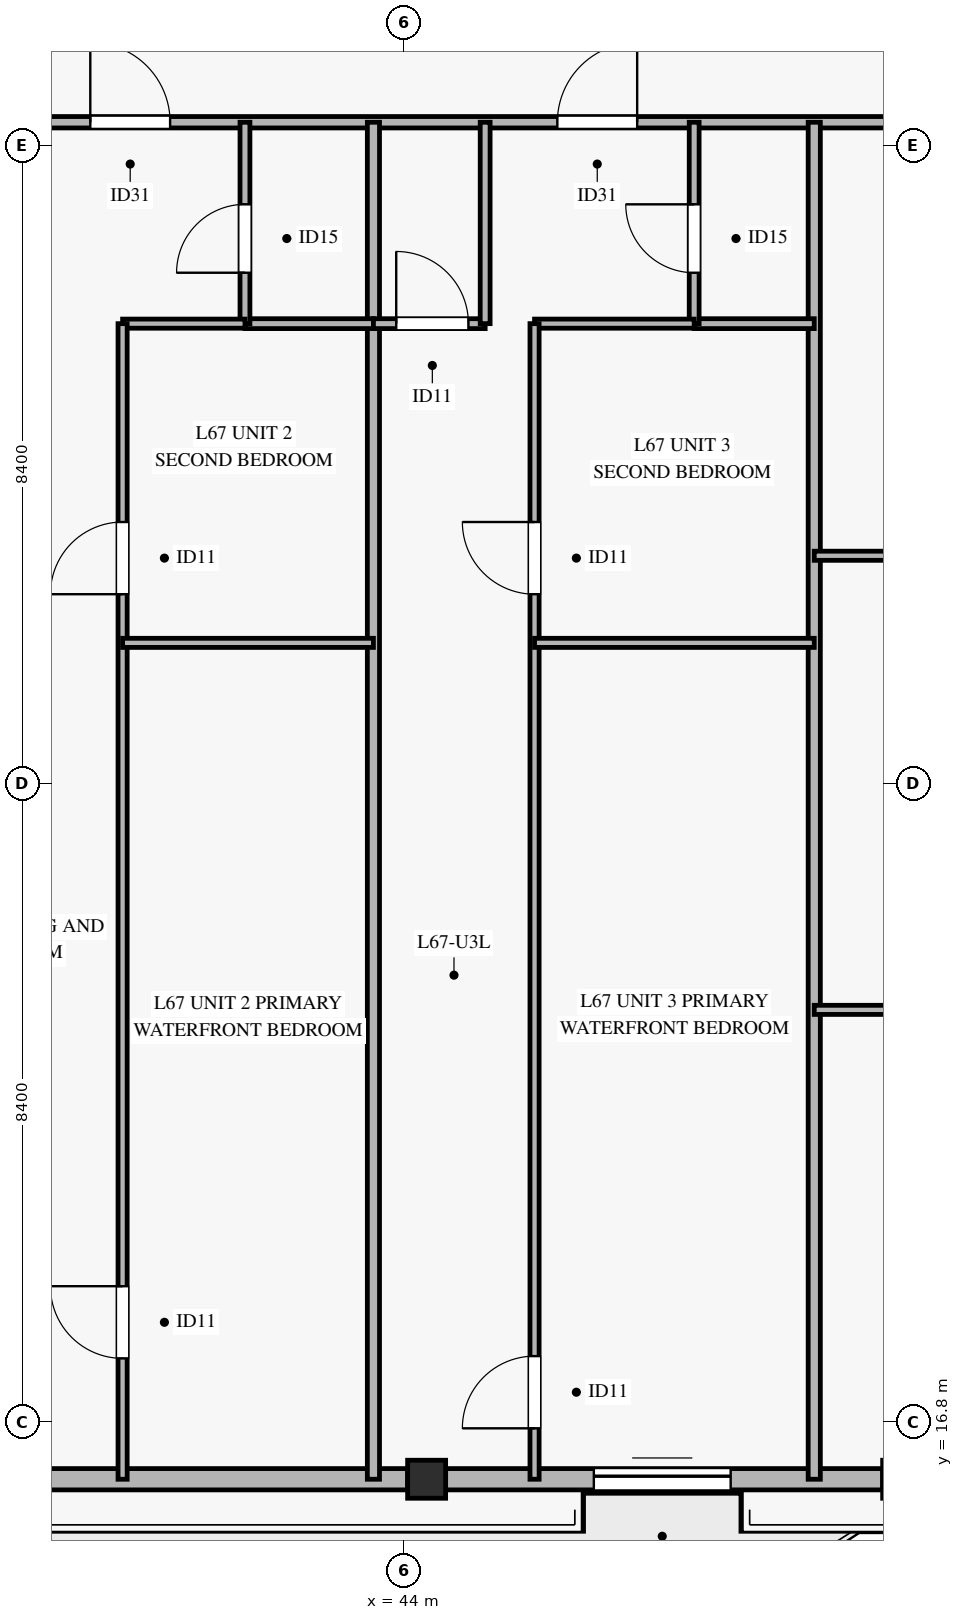
"""IFC4 building model, lengths in metres.
Left out: names, types, materials, properties, quantities, classifications, styles, units other than length and angle.
Written with IfcOpenShell. Run it as: python <this file> out.ifc"""

import sys

from ifc_helpers import new_model, si_unit, direction, frame, frame_2d, origin, origin_2d, place, context, subcontext, project, spatial, rectangle, hollow_rectangle, extrude, source, transform, mapped, element, fill, save


model = new_model("IFC4")
c1 = context("Model", 3, precision=1e-05, world=origin(), true_north=direction((0.0, 1.0)))
c2 = subcontext(c1, "Body", "Model", "MODEL_VIEW")
j1 = project(units=[si_unit("LENGTHUNIT", "METRE"), si_unit("PLANEANGLEUNIT", "RADIAN")], contexts=[c1])
p1 = place(None, origin())
s1 = spatial("IfcSite", under=j1, at=p1, CompositionType="ELEMENT")
p2 = place(p1, origin())
s2 = spatial("IfcBuilding", under=s1, at=p2, CompositionType="ELEMENT")
p3 = place(p2, frame((0.0, 0.0, 262.1)))
s3 = spatial("IfcBuildingStorey", under=s2, at=p3, CompositionType="ELEMENT", Elevation=262.1)
m1 = source(origin(), c2, "Body", "SweptSolid", [
    extrude(hollow_rectangle(XDim=0.5, YDim=0.5, WallThickness=0.024, at=origin_2d()), origin(), (0.0, 0.0, 1.0), 3.185),
])
for number, where, z_axis, x_axis in (
    (1, (44.3, 16.045, 0.0), (0.0, 0.0, 1.0), (1.0, 0.0, 0.0)),
    (2, (50.55, 16.045, 0.0), (0.0, 0.0, 1.0), (1.0, 0.0, 0.0)),
):
    element("IfcColumn", number, at=place(p3, frame(where, z_axis=z_axis, x_axis=x_axis)), inside=s3, PredefinedType="COLUMN", context=c2, shape_type="MappedRepresentation", body=[
        mapped(m1, transform((0.0, 0.0, 0.0), x_axis=(1.0, 0.0, 0.0), y_axis=(0.0, 1.0, 0.0), z_axis=(0.0, 0.0, 1.0), scale=1.0)),
    ])
p4 = place(p3, frame((37.8, 16.045, 0.0), z_axis=(0.0, 0.0, 1.0), x_axis=(1.0, 0.0, 0.0)))
e3 = element("IfcWall", 3, at=p4, inside=s3, PredefinedType="SOLIDWALL", context=c2, shape_type="SweptSolid", body=[
    extrude(rectangle(XDim=6.25, YDim=0.28, at=frame_2d((3.125, 0.0))), origin(), (0.0, 0.0, 1.0), 2.815),
])
p5 = place(p3, frame((44.55, 16.045, 0.0), z_axis=(0.0, 0.0, 1.0), x_axis=(1.0, 0.0, 0.0)))
e4 = element("IfcWall", 4, at=p5, inside=s3, PredefinedType="SOLIDWALL", context=c2, shape_type="SweptSolid", body=[
    extrude(rectangle(XDim=5.75, YDim=0.28, at=frame_2d((2.875, 0.0))), origin(), (0.0, 0.0, 1.0), 2.815),
])
p6 = place(p5, frame((1.95, 0.0, 0.0)))
e5 = element("IfcOpeningElement", 5, at=p6, cuts=e4, PredefinedType="OPENING", context=c2, shape_type="SweptSolid", body=[
    extrude(rectangle(XDim=1.8, YDim=2.25, at=frame_2d((0.9, 1.125))), frame((0.0, 0.15, 0.0), z_axis=(0.0, -1.0, 0.0), x_axis=(1.0, 0.0, 0.0)), (0.0, 0.0, 1.0), 0.3),
])
p7 = place(p3, frame((8.779, 33.9, 0.0), z_axis=(0.0, 0.0, 1.0), x_axis=(1.0, 0.0, 0.0)))
e6 = element("IfcWall", 6, at=p7, inside=s3, PredefinedType="PARTITIONING", context=c2, shape_type="SweptSolid", body=[
    extrude(rectangle(XDim=52.843, YDim=0.15, at=frame_2d((26.421, 0.0))), origin(), (0.0, 0.0, 1.0), 2.47),
])
p8 = place(p7, frame((5.887, 0.0, 0.0)))
e7 = element("IfcOpeningElement", 7, at=p8, cuts=e6, PredefinedType="OPENING", context=c2, shape_type="SweptSolid", body=[
    extrude(rectangle(XDim=1.05, YDim=2.15, at=frame_2d((0.525, 1.075))), frame((0.0, 0.085, 0.0), z_axis=(0.0, -1.0, 0.0), x_axis=(1.0, 0.0, 0.0)), (0.0, 0.0, 1.0), 0.17),
])
p9 = place(p7, frame((17.646, 0.0, 0.0)))
e8 = element("IfcOpeningElement", 8, at=p9, cuts=e6, PredefinedType="OPENING", context=c2, shape_type="SweptSolid", body=[
    extrude(rectangle(XDim=1.05, YDim=2.15, at=frame_2d((0.525, 1.075))), frame((0.0, 0.085, 0.0), z_axis=(0.0, -1.0, 0.0), x_axis=(1.0, 0.0, 0.0)), (0.0, 0.0, 1.0), 0.17),
])
p10 = place(p7, frame((24.174, 0.0, 0.0)))
e9 = element("IfcOpeningElement", 9, at=p10, cuts=e6, PredefinedType="OPENING", context=c2, shape_type="SweptSolid", body=[
    extrude(rectangle(XDim=1.05, YDim=2.15, at=frame_2d((0.525, 1.075))), frame((0.0, 0.085, 0.0), z_axis=(0.0, -1.0, 0.0), x_axis=(1.0, 0.0, 0.0)), (0.0, 0.0, 1.0), 0.17),
])
p11 = place(p7, frame((31.096, 0.0, 0.0)))
e10 = element("IfcOpeningElement", 10, at=p11, cuts=e6, PredefinedType="OPENING", context=c2, shape_type="SweptSolid", body=[
    extrude(rectangle(XDim=1.05, YDim=2.15, at=frame_2d((0.525, 1.075))), frame((0.0, 0.085, 0.0), z_axis=(0.0, -1.0, 0.0), x_axis=(1.0, 0.0, 0.0)), (0.0, 0.0, 1.0), 0.17),
])
p12 = place(p7, frame((37.241, 0.0, 0.0)))
e11 = element("IfcOpeningElement", 11, at=p12, cuts=e6, PredefinedType="OPENING", context=c2, shape_type="SweptSolid", body=[
    extrude(rectangle(XDim=1.05, YDim=2.15, at=frame_2d((0.525, 1.075))), frame((0.0, 0.085, 0.0), z_axis=(0.0, -1.0, 0.0), x_axis=(1.0, 0.0, 0.0)), (0.0, 0.0, 1.0), 0.17),
])
p13 = place(p7, frame((45.359, 0.0, 0.0)))
e12 = element("IfcOpeningElement", 12, at=p13, cuts=e6, PredefinedType="OPENING", context=c2, shape_type="SweptSolid", body=[
    extrude(rectangle(XDim=1.05, YDim=2.15, at=frame_2d((0.525, 1.075))), frame((0.0, 0.085, 0.0), z_axis=(0.0, -1.0, 0.0), x_axis=(1.0, 0.0, 0.0)), (0.0, 0.0, 1.0), 0.17),
])
for number, where, z_axis, x_axis in (
    (13, (43.6, 16.045, 0.0), (0.0, 0.0, 1.0), (0.0, 1.0, 0.0)),
    (14, (49.4, 16.045, 0.0), (0.0, 0.0, 1.0), (0.0, 1.0, 0.0)),
):
    element("IfcWall", number, at=place(p3, frame(where, z_axis=z_axis, x_axis=x_axis)), inside=s3, PredefinedType="PARTITIONING", context=c2, shape_type="SweptSolid", body=[
        extrude(rectangle(XDim=17.855, YDim=0.16, at=frame_2d((8.927, 0.0))), origin(), (0.0, 0.0, 1.0), 2.77),
    ])
p14 = place(p3, frame((41.91, 31.25, 0.0), z_axis=(0.0, 0.0, 1.0), x_axis=(1.0, 0.0, 0.0)))
e15 = element("IfcWall", 15, at=p14, inside=s3, PredefinedType="PARTITIONING", context=c2, shape_type="SweptSolid", body=[
    extrude(rectangle(XDim=1.69, YDim=0.13, at=frame_2d((0.845, 0.0))), origin(), (0.0, 0.0, 1.0), 3.185),
])
p15 = place(p3, frame((41.91, 31.25, 0.0), z_axis=(0.0, 0.0, 1.0), x_axis=(0.0, 1.0, 0.0)))
e16 = element("IfcWall", 16, at=p15, inside=s3, PredefinedType="PARTITIONING", context=c2, shape_type="SweptSolid", body=[
    extrude(rectangle(XDim=2.65, YDim=0.13, at=frame_2d((1.325, 0.0))), origin(), (0.0, 0.0, 1.0), 2.77),
])
p16 = place(p15, frame((0.67, 0.0, 0.0)))
e17 = element("IfcOpeningElement", 17, at=p16, cuts=e16, PredefinedType="OPENING", context=c2, shape_type="SweptSolid", body=[
    extrude(rectangle(XDim=0.9, YDim=2.1, at=frame_2d((0.45, 1.05))), frame((0.0, 0.075, 0.0), z_axis=(0.0, -1.0, 0.0), x_axis=(1.0, 0.0, 0.0)), (0.0, 0.0, 1.0), 0.15),
])
p17 = place(p3, frame((40.3, 31.25, 0.0), z_axis=(0.0, 0.0, 1.0), x_axis=(1.0, 0.0, 0.0)))
e18 = element("IfcWall", 18, at=p17, inside=s3, PredefinedType="PARTITIONING", context=c2, shape_type="SweptSolid", body=[
    extrude(rectangle(XDim=1.61, YDim=0.12, at=frame_2d((0.805, 0.0))), origin(), (0.0, 0.0, 1.0), 3.185),
])
p18 = place(p3, frame((40.3, 16.045, 0.0), z_axis=(0.0, 0.0, 1.0), x_axis=(0.0, 1.0, 0.0)))
e19 = element("IfcWall", 19, at=p18, inside=s3, PredefinedType="PARTITIONING", context=c2, shape_type="SweptSolid", body=[
    extrude(rectangle(XDim=15.205, YDim=0.12, at=frame_2d((7.603, 0.0))), origin(), (0.0, 0.0, 1.0), 2.77),
])
p19 = place(p18, frame((1.59, 0.0, 0.0)))
e20 = element("IfcOpeningElement", 20, at=p19, cuts=e19, PredefinedType="OPENING", context=c2, shape_type="SweptSolid", body=[
    extrude(rectangle(XDim=0.95, YDim=2.1, at=frame_2d((0.475, 1.05))), frame((0.0, 0.07, 0.0), z_axis=(0.0, -1.0, 0.0), x_axis=(1.0, 0.0, 0.0)), (0.0, 0.0, 1.0), 0.14),
])
p20 = place(p18, frame((11.645, 0.0, 0.0)))
e21 = element("IfcOpeningElement", 21, at=p20, cuts=e19, PredefinedType="OPENING", context=c2, shape_type="SweptSolid", body=[
    extrude(rectangle(XDim=0.95, YDim=2.1, at=frame_2d((0.475, 1.05))), frame((0.0, 0.07, 0.0), z_axis=(0.0, -1.0, 0.0), x_axis=(1.0, 0.0, 0.0)), (0.0, 0.0, 1.0), 0.14),
])
p21 = place(p3, frame((40.3, 27.05, 0.0), z_axis=(0.0, 0.0, 1.0), x_axis=(1.0, 0.0, 0.0)))
e22 = element("IfcWall", 22, at=p21, inside=s3, PredefinedType="PARTITIONING", context=c2, shape_type="SweptSolid", body=[
    extrude(rectangle(XDim=3.3, YDim=0.12, at=frame_2d((1.65, 0.0))), origin(), (0.0, 0.0, 1.0), 3.185),
])
p22 = place(p3, frame((43.6, 31.25, 0.0), z_axis=(0.0, 0.0, 1.0), x_axis=(1.0, 0.0, 0.0)))
e23 = element("IfcWall", 23, at=p22, inside=s3, PredefinedType="PARTITIONING", context=c2, shape_type="SweptSolid", body=[
    extrude(rectangle(XDim=1.47, YDim=0.13, at=frame_2d((0.735, 0.0))), origin(), (0.0, 0.0, 1.0), 2.47),
])
p23 = place(p22, frame((0.3, 0.0, 0.0)))
e24 = element("IfcOpeningElement", 24, at=p23, cuts=e23, PredefinedType="OPENING", context=c2, shape_type="SweptSolid", body=[
    extrude(rectangle(XDim=0.95, YDim=2.1, at=frame_2d((0.475, 1.05))), frame((0.0, 0.075, 0.0), z_axis=(0.0, -1.0, 0.0), x_axis=(1.0, 0.0, 0.0)), (0.0, 0.0, 1.0), 0.15),
])
p24 = place(p3, frame((45.07, 31.25, 0.0), z_axis=(0.0, 0.0, 1.0), x_axis=(0.0, 1.0, 0.0)))
e25 = element("IfcWall", 25, at=p24, inside=s3, PredefinedType="PARTITIONING", context=c2, shape_type="SweptSolid", body=[
    extrude(rectangle(XDim=2.65, YDim=0.13, at=frame_2d((1.325, 0.0))), origin(), (0.0, 0.0, 1.0), 2.77),
])
p25 = place(p3, frame((47.82, 31.25, 0.0), z_axis=(0.0, 0.0, 1.0), x_axis=(1.0, 0.0, 0.0)))
e26 = element("IfcWall", 26, at=p25, inside=s3, PredefinedType="PARTITIONING", context=c2, shape_type="SweptSolid", body=[
    extrude(rectangle(XDim=1.58, YDim=0.13, at=frame_2d((0.79, 0.0))), origin(), (0.0, 0.0, 1.0), 3.185),
])
p26 = place(p3, frame((47.82, 31.25, 0.0), z_axis=(0.0, 0.0, 1.0), x_axis=(0.0, 1.0, 0.0)))
e27 = element("IfcWall", 27, at=p26, inside=s3, PredefinedType="PARTITIONING", context=c2, shape_type="SweptSolid", body=[
    extrude(rectangle(XDim=2.65, YDim=0.13, at=frame_2d((1.325, 0.0))), origin(), (0.0, 0.0, 1.0), 2.77),
])
p27 = place(p26, frame((0.67, 0.0, 0.0)))
e28 = element("IfcOpeningElement", 28, at=p27, cuts=e27, PredefinedType="OPENING", context=c2, shape_type="SweptSolid", body=[
    extrude(rectangle(XDim=0.9, YDim=2.1, at=frame_2d((0.45, 1.05))), frame((0.0, 0.075, 0.0), z_axis=(0.0, -1.0, 0.0), x_axis=(1.0, 0.0, 0.0)), (0.0, 0.0, 1.0), 0.15),
])
p28 = place(p3, frame((45.72, 31.25, 0.0), z_axis=(0.0, 0.0, 1.0), x_axis=(1.0, 0.0, 0.0)))
e29 = element("IfcWall", 29, at=p28, inside=s3, PredefinedType="PARTITIONING", context=c2, shape_type="SweptSolid", body=[
    extrude(rectangle(XDim=2.1, YDim=0.12, at=frame_2d((1.05, 0.0))), origin(), (0.0, 0.0, 1.0), 3.185),
])
p29 = place(p3, frame((45.72, 16.045, 0.0), z_axis=(0.0, 0.0, 1.0), x_axis=(0.0, 1.0, 0.0)))
e30 = element("IfcWall", 30, at=p29, inside=s3, PredefinedType="PARTITIONING", context=c2, shape_type="SweptSolid", body=[
    extrude(rectangle(XDim=15.205, YDim=0.12, at=frame_2d((7.603, 0.0))), origin(), (0.0, 0.0, 1.0), 2.77),
])
p30 = place(p29, frame((0.67, 0.0, 0.0)))
e31 = element("IfcOpeningElement", 31, at=p30, cuts=e30, PredefinedType="OPENING", context=c2, shape_type="SweptSolid", body=[
    extrude(rectangle(XDim=0.95, YDim=2.1, at=frame_2d((0.475, 1.05))), frame((0.0, 0.07, 0.0), z_axis=(0.0, -1.0, 0.0), x_axis=(1.0, 0.0, 0.0)), (0.0, 0.0, 1.0), 0.14),
])
p31 = place(p29, frame((11.645, 0.0, 0.0)))
e32 = element("IfcOpeningElement", 32, at=p31, cuts=e30, PredefinedType="OPENING", context=c2, shape_type="SweptSolid", body=[
    extrude(rectangle(XDim=0.95, YDim=2.1, at=frame_2d((0.475, 1.05))), frame((0.0, 0.07, 0.0), z_axis=(0.0, -1.0, 0.0), x_axis=(1.0, 0.0, 0.0)), (0.0, 0.0, 1.0), 0.14),
])
p32 = place(p3, frame((45.72, 27.05, 0.0), z_axis=(0.0, 0.0, 1.0), x_axis=(1.0, 0.0, 0.0)))
e33 = element("IfcWall", 33, at=p32, inside=s3, PredefinedType="PARTITIONING", context=c2, shape_type="SweptSolid", body=[
    extrude(rectangle(XDim=3.68, YDim=0.12, at=frame_2d((1.84, 0.0))), origin(), (0.0, 0.0, 1.0), 3.185),
])
p33 = place(p3, frame((49.4, 22.221, 0.0), z_axis=(0.0, 0.0, 1.0), x_axis=(1.0, 0.0, 0.0)))
e34 = element("IfcWall", 34, at=p33, inside=s3, PredefinedType="PARTITIONING", context=c2, shape_type="SweptSolid", body=[
    extrude(rectangle(XDim=12.222, YDim=0.12, at=frame_2d((6.111, 0.0))), origin(), (0.0, 0.0, 1.0), 2.47),
])
p34 = place(p33, frame((4.975, 0.0, 0.0)))
e35 = element("IfcOpeningElement", 35, at=p34, cuts=e34, PredefinedType="OPENING", context=c2, shape_type="SweptSolid", body=[
    extrude(rectangle(XDim=0.95, YDim=2.1, at=frame_2d((0.475, 1.05))), frame((0.0, 0.07, 0.0), z_axis=(0.0, -1.0, 0.0), x_axis=(1.0, 0.0, 0.0)), (0.0, 0.0, 1.0), 0.14),
])
p35 = place(p3, frame((49.4, 28.196, 0.0), z_axis=(0.0, 0.0, 1.0), x_axis=(1.0, 0.0, 0.0)))
e36 = element("IfcWall", 36, at=p35, inside=s3, PredefinedType="PARTITIONING", context=c2, shape_type="SweptSolid", body=[
    extrude(rectangle(XDim=12.222, YDim=0.12, at=frame_2d((6.111, 0.0))), origin(), (0.0, 0.0, 1.0), 2.47),
])
p36 = place(p35, frame((4.975, 0.0, 0.0)))
e37 = element("IfcOpeningElement", 37, at=p36, cuts=e36, PredefinedType="OPENING", context=c2, shape_type="SweptSolid", body=[
    extrude(rectangle(XDim=0.95, YDim=2.1, at=frame_2d((0.475, 1.05))), frame((0.0, 0.07, 0.0), z_axis=(0.0, -1.0, 0.0), x_axis=(1.0, 0.0, 0.0)), (0.0, 0.0, 1.0), 0.14),
])
m2 = source(origin(), c2, "Body", "SweptSolid", [
    extrude(rectangle(XDim=1.8, YDim=2.25, at=frame_2d((0.9, 1.125))), frame((0.0, 0.025, 0.0), z_axis=(0.0, -1.0, 0.0), x_axis=(1.0, 0.0, 0.0)), (0.0, 0.0, 1.0), 0.05),
])
p37 = place(p6, origin())
e38 = element("IfcDoor", 38, at=p37, inside=s3, OperationType="SLIDING_TO_LEFT", PredefinedType="DOOR", context=c2, shape_type="MappedRepresentation", body=[
    mapped(m2, transform((0.0, 0.0, 0.0), x_axis=(1.0, 0.0, 0.0), y_axis=(0.0, 1.0, 0.0), z_axis=(0.0, 0.0, 1.0), scale=1.0)),
])
fill(e5, e38)
m3 = source(origin(), c2, "Body", "SweptSolid", [
    extrude(rectangle(XDim=1.05, YDim=2.15, at=frame_2d((0.525, 1.075))), frame((0.0, 0.025, 0.0), z_axis=(0.0, -1.0, 0.0), x_axis=(1.0, 0.0, 0.0)), (0.0, 0.0, 1.0), 0.05),
])
p38 = place(p11, origin())
e39 = element("IfcDoor", 39, at=p38, inside=s3, OperationType="SINGLE_SWING_LEFT", PredefinedType="DOOR", context=c2, shape_type="MappedRepresentation", body=[
    mapped(m3, transform((0.0, 0.0, 0.0), x_axis=(1.0, 0.0, 0.0), y_axis=(0.0, 1.0, 0.0), z_axis=(0.0, 0.0, 1.0), scale=1.0)),
])
fill(e10, e39)
m4 = source(origin(), c2, "Body", "SweptSolid", [
    extrude(rectangle(XDim=0.9, YDim=2.1, at=frame_2d((0.45, 1.05))), frame((0.0, 0.025, 0.0), z_axis=(0.0, -1.0, 0.0), x_axis=(1.0, 0.0, 0.0)), (0.0, 0.0, 1.0), 0.05),
])
p39 = place(p16, origin())
e40 = element("IfcDoor", 40, at=p39, inside=s3, OperationType="SINGLE_SWING_LEFT", PredefinedType="DOOR", context=c2, shape_type="MappedRepresentation", body=[
    mapped(m4, transform((0.0, 0.0, 0.0), x_axis=(1.0, 0.0, 0.0), y_axis=(0.0, 1.0, 0.0), z_axis=(0.0, 0.0, 1.0), scale=1.0)),
])
fill(e17, e40)
m5 = source(origin(), c2, "Body", "SweptSolid", [
    extrude(rectangle(XDim=0.95, YDim=2.1, at=frame_2d((0.475, 1.05))), frame((0.0, 0.025, 0.0), z_axis=(0.0, -1.0, 0.0), x_axis=(1.0, 0.0, 0.0)), (0.0, 0.0, 1.0), 0.05),
])
p40 = place(p19, origin())
e41 = element("IfcDoor", 41, at=p40, inside=s3, OperationType="SINGLE_SWING_RIGHT", PredefinedType="DOOR", context=c2, shape_type="MappedRepresentation", body=[
    mapped(m5, transform((0.0, 0.0, 0.0), x_axis=(1.0, 0.0, 0.0), y_axis=(0.0, 1.0, 0.0), z_axis=(0.0, 0.0, 1.0), scale=1.0)),
])
fill(e20, e41)
p41 = place(p20, origin())
e42 = element("IfcDoor", 42, at=p41, inside=s3, OperationType="SINGLE_SWING_LEFT", PredefinedType="DOOR", context=c2, shape_type="MappedRepresentation", body=[
    mapped(m5, transform((0.0, 0.0, 0.0), x_axis=(1.0, 0.0, 0.0), y_axis=(0.0, 1.0, 0.0), z_axis=(0.0, 0.0, 1.0), scale=1.0)),
])
fill(e21, e42)
p42 = place(p12, origin())
e43 = element("IfcDoor", 43, at=p42, inside=s3, OperationType="SINGLE_SWING_RIGHT", PredefinedType="DOOR", context=c2, shape_type="MappedRepresentation", body=[
    mapped(m3, transform((0.0, 0.0, 0.0), x_axis=(1.0, 0.0, 0.0), y_axis=(0.0, 1.0, 0.0), z_axis=(0.0, 0.0, 1.0), scale=1.0)),
])
fill(e11, e43)
p43 = place(p23, origin())
e44 = element("IfcDoor", 44, at=p43, inside=s3, OperationType="SINGLE_SWING_LEFT", PredefinedType="DOOR", context=c2, shape_type="MappedRepresentation", body=[
    mapped(m5, transform((0.0, 0.0, 0.0), x_axis=(1.0, 0.0, 0.0), y_axis=(0.0, 1.0, 0.0), z_axis=(0.0, 0.0, 1.0), scale=1.0)),
])
fill(e24, e44)
p44 = place(p27, origin())
e45 = element("IfcDoor", 45, at=p44, inside=s3, OperationType="SINGLE_SWING_RIGHT", PredefinedType="DOOR", context=c2, shape_type="MappedRepresentation", body=[
    mapped(m4, transform((0.0, 0.0, 0.0), x_axis=(1.0, 0.0, 0.0), y_axis=(0.0, 1.0, 0.0), z_axis=(0.0, 0.0, 1.0), scale=1.0)),
])
fill(e28, e45)
p45 = place(p30, origin())
e46 = element("IfcDoor", 46, at=p45, inside=s3, OperationType="SINGLE_SWING_LEFT", PredefinedType="DOOR", context=c2, shape_type="MappedRepresentation", body=[
    mapped(m5, transform((0.0, 0.0, 0.0), x_axis=(1.0, 0.0, 0.0), y_axis=(0.0, 1.0, 0.0), z_axis=(0.0, 0.0, 1.0), scale=1.0)),
])
fill(e31, e46)
p46 = place(p31, origin())
e47 = element("IfcDoor", 47, at=p46, inside=s3, OperationType="SINGLE_SWING_RIGHT", PredefinedType="DOOR", context=c2, shape_type="MappedRepresentation", body=[
    mapped(m5, transform((0.0, 0.0, 0.0), x_axis=(1.0, 0.0, 0.0), y_axis=(0.0, 1.0, 0.0), z_axis=(0.0, 0.0, 1.0), scale=1.0)),
])
fill(e32, e47)
save(model, sys.argv[1])
